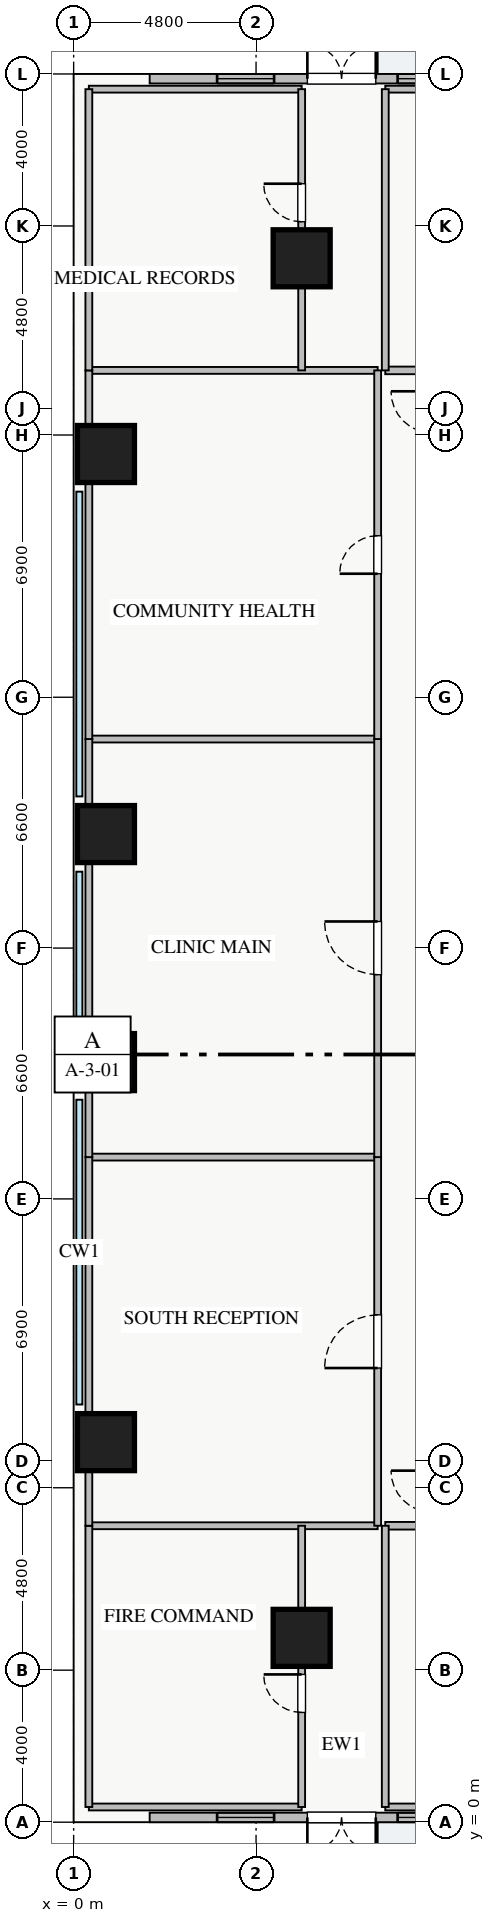
"""IFC4 building model, lengths in metres.
Left out: names, types, materials, properties, quantities, classifications, styles, units other than length and angle.
Written with IfcOpenShell. Run it as: python <this file> out.ifc"""

import sys

from ifc_helpers import new_model, si_unit, direction, frame, frame_2d, origin, origin_2d, place, context, subcontext, project, spatial, rectangle, extrude, source, transform, mapped, element, fill, save


model = new_model("IFC4")
c1 = context("Model", 3, precision=1e-05, world=origin(), true_north=direction((0.0, 1.0)))
c2 = subcontext(c1, "Body", "Model", "MODEL_VIEW")
j1 = project(units=[si_unit("LENGTHUNIT", "METRE"), si_unit("PLANEANGLEUNIT", "RADIAN")], contexts=[c1])
p1 = place(None, origin())
s1 = spatial("IfcSite", under=j1, at=p1, CompositionType="ELEMENT")
p2 = place(p1, origin())
s2 = spatial("IfcBuilding", under=s1, at=p2, CompositionType="ELEMENT")
p3 = place(p2, origin())
s3 = spatial("IfcBuildingStorey", under=s2, at=p3, CompositionType="ELEMENT", Elevation=0.0)
m1 = source(origin(), c2, "Body", "SweptSolid", [
    extrude(rectangle(XDim=1.5, YDim=1.5, at=origin_2d()), origin(), (0.0, 0.0, 1.0), 5.0),
])
for number, where, z_axis, x_axis in (
    (1, (6.0, 4.85, 0.0), (0.0, 0.0, 1.0), (1.0, 0.0, 0.0)),
    (2, (6.0, 41.15, 0.0), (0.0, 0.0, 1.0), (1.0, 0.0, 0.0)),
    (3, (0.85, 36.0, 0.0), (0.0, 0.0, 1.0), (1.0, 0.0, 0.0)),
    (4, (0.85, 26.0, 0.0), (0.0, 0.0, 1.0), (1.0, 0.0, 0.0)),
    (5, (0.85, 20.0, 0.0), (0.0, 0.0, 1.0), (1.0, 0.0, 0.0)),
    (6, (0.85, 10.0, 0.0), (0.0, 0.0, 1.0), (1.0, 0.0, 0.0)),
):
    element("IfcColumn", number, at=place(p3, frame(where, z_axis=z_axis, x_axis=x_axis)), inside=s3, PredefinedType="COLUMN", context=c2, shape_type="MappedRepresentation", body=[
        mapped(m1, transform((0.0, 0.0, 0.0), x_axis=(1.0, 0.0, 0.0), y_axis=(0.0, 1.0, 0.0), z_axis=(0.0, 0.0, 1.0), scale=1.0)),
    ])
p4 = place(p3, frame((2.0, 0.125, 0.0), z_axis=(0.0, 0.0, 1.0), x_axis=(1.0, 0.0, 0.0)))
e7 = element("IfcWall", 7, at=p4, inside=s3, PredefinedType="STANDARD", context=c2, shape_type="SweptSolid", body=[
    extrude(rectangle(XDim=10.1, YDim=0.25, at=frame_2d((5.05, 0.0))), origin(), (0.0, 0.0, 1.0), 4.32),
])
p5 = place(p4, frame((4.15, 0.0, 0.0)))
e8 = element("IfcOpeningElement", 8, at=p5, cuts=e7, PredefinedType="OPENING", context=c2, shape_type="SweptSolid", body=[
    extrude(rectangle(XDim=1.8, YDim=2.2, at=frame_2d((0.9, 1.1))), frame((0.0, 0.135, 0.0), z_axis=(0.0, -1.0, 0.0), x_axis=(1.0, 0.0, 0.0)), (0.0, 0.0, 1.0), 0.27),
])
p6 = place(p4, frame((1.775, 0.0, 0.9)))
e9 = element("IfcOpeningElement", 9, at=p6, cuts=e7, PredefinedType="OPENING", context=c2, shape_type="SweptSolid", body=[
    extrude(rectangle(XDim=1.5, YDim=1.45, at=frame_2d((0.75, 0.725))), frame((0.0, 0.135, 0.0), z_axis=(0.0, -1.0, 0.0), x_axis=(1.0, 0.0, 0.0)), (0.0, 0.0, 1.0), 0.27),
])
p7 = place(p4, frame((6.525, 0.0, 0.9)))
e10 = element("IfcOpeningElement", 10, at=p7, cuts=e7, PredefinedType="OPENING", context=c2, shape_type="SweptSolid", body=[
    extrude(rectangle(XDim=2.1, YDim=1.48, at=frame_2d((1.05, 0.74))), frame((0.0, 0.135, 0.0), z_axis=(0.0, -1.0, 0.0), x_axis=(1.0, 0.0, 0.0)), (0.0, 0.0, 1.0), 0.27),
])
p8 = place(p3, frame((2.0, 45.875, 0.0), z_axis=(0.0, 0.0, 1.0), x_axis=(1.0, 0.0, 0.0)))
e11 = element("IfcWall", 11, at=p8, inside=s3, PredefinedType="STANDARD", context=c2, shape_type="SweptSolid", body=[
    extrude(rectangle(XDim=10.1, YDim=0.25, at=frame_2d((5.05, 0.0))), origin(), (0.0, 0.0, 1.0), 4.32),
])
p9 = place(p8, frame((4.15, 0.0, 0.0)))
e12 = element("IfcOpeningElement", 12, at=p9, cuts=e11, PredefinedType="OPENING", context=c2, shape_type="SweptSolid", body=[
    extrude(rectangle(XDim=1.8, YDim=2.2, at=frame_2d((0.9, 1.1))), frame((0.0, 0.135, 0.0), z_axis=(0.0, -1.0, 0.0), x_axis=(1.0, 0.0, 0.0)), (0.0, 0.0, 1.0), 0.27),
])
p10 = place(p8, frame((1.775, 0.0, 0.9)))
e13 = element("IfcOpeningElement", 13, at=p10, cuts=e11, PredefinedType="OPENING", context=c2, shape_type="SweptSolid", body=[
    extrude(rectangle(XDim=1.5, YDim=1.45, at=frame_2d((0.75, 0.725))), frame((0.0, 0.135, 0.0), z_axis=(0.0, -1.0, 0.0), x_axis=(1.0, 0.0, 0.0)), (0.0, 0.0, 1.0), 0.27),
])
p11 = place(p8, frame((6.525, 0.0, 0.9)))
e14 = element("IfcOpeningElement", 14, at=p11, cuts=e11, PredefinedType="OPENING", context=c2, shape_type="SweptSolid", body=[
    extrude(rectangle(XDim=2.1, YDim=1.48, at=frame_2d((1.05, 0.74))), frame((0.0, 0.135, 0.0), z_axis=(0.0, -1.0, 0.0), x_axis=(1.0, 0.0, 0.0)), (0.0, 0.0, 1.0), 0.27),
])
p12 = place(p3, frame((8.2, 38.2, 0.0), z_axis=(0.0, 0.0, 1.0), x_axis=(1.0, 0.0, 0.0)))
e15 = element("IfcWall", 15, at=p12, inside=s3, PredefinedType="PARTITIONING", context=c2, shape_type="SweptSolid", body=[
    extrude(rectangle(XDim=9.8, YDim=0.2, at=frame_2d((4.9, 0.0))), origin(), (0.0, 0.0, 1.0), 4.78),
])
p13 = place(p12, frame((4.4, 0.0, 0.0)))
e16 = element("IfcOpeningElement", 16, at=p13, cuts=e15, PredefinedType="OPENING", context=c2, shape_type="SweptSolid", body=[
    extrude(rectangle(XDim=1.0, YDim=2.05, at=frame_2d((0.5, 1.025))), frame((0.0, 0.11, 0.0), z_axis=(0.0, -1.0, 0.0), x_axis=(1.0, 0.0, 0.0)), (0.0, 0.0, 1.0), 0.22),
])
p14 = place(p3, frame((8.2, 7.8, 0.0), z_axis=(0.0, 0.0, 1.0), x_axis=(1.0, 0.0, 0.0)))
e17 = element("IfcWall", 17, at=p14, inside=s3, PredefinedType="PARTITIONING", context=c2, shape_type="SweptSolid", body=[
    extrude(rectangle(XDim=9.8, YDim=0.2, at=frame_2d((4.9, 0.0))), origin(), (0.0, 0.0, 1.0), 4.78),
])
p15 = place(p14, frame((4.4, 0.0, 0.0)))
e18 = element("IfcOpeningElement", 18, at=p15, cuts=e17, PredefinedType="OPENING", context=c2, shape_type="SweptSolid", body=[
    extrude(rectangle(XDim=1.0, YDim=2.05, at=frame_2d((0.5, 1.025))), frame((0.0, 0.11, 0.0), z_axis=(0.0, -1.0, 0.0), x_axis=(1.0, 0.0, 0.0)), (0.0, 0.0, 1.0), 0.22),
])
p16 = place(p3, frame((0.4, 0.4, 0.0), z_axis=(0.0, 0.0, 1.0), x_axis=(1.0, 0.0, 0.0)))
e19 = element("IfcWall", 19, at=p16, inside=s3, PredefinedType="PARTITIONING", context=c2, shape_type="SweptSolid", body=[
    extrude(rectangle(XDim=5.6, YDim=0.18, at=frame_2d((2.8, 0.0))), origin(), (0.0, 0.0, 1.0), 4.78),
])
p17 = place(p3, frame((0.4, 7.8, 0.0), z_axis=(0.0, 0.0, 1.0), x_axis=(1.0, 0.0, 0.0)))
e20 = element("IfcWall", 20, at=p17, inside=s3, PredefinedType="PARTITIONING", context=c2, shape_type="SweptSolid", body=[
    extrude(rectangle(XDim=7.6, YDim=0.18, at=frame_2d((3.8, 0.0))), origin(), (0.0, 0.0, 1.0), 4.78),
])
p18 = place(p3, frame((0.4, 0.4, 0.0), z_axis=(0.0, 0.0, 1.0), x_axis=(0.0, 1.0, 0.0)))
e21 = element("IfcWall", 21, at=p18, inside=s3, PredefinedType="PARTITIONING", context=c2, shape_type="SweptSolid", body=[
    extrude(rectangle(XDim=7.4, YDim=0.18, at=frame_2d((3.7, 0.0))), origin(), (0.0, 0.0, 1.0), 4.78),
])
p19 = place(p3, frame((6.0, 0.4, 0.0), z_axis=(0.0, 0.0, 1.0), x_axis=(0.0, 1.0, 0.0)))
e22 = element("IfcWall", 22, at=p19, inside=s3, PredefinedType="PARTITIONING", context=c2, shape_type="SweptSolid", body=[
    extrude(rectangle(XDim=7.4, YDim=0.18, at=frame_2d((3.7, 0.0))), origin(), (0.0, 0.0, 1.0), 4.78),
])
p20 = place(p19, frame((2.488, 0.0, 0.0)))
e23 = element("IfcOpeningElement", 23, at=p20, cuts=e22, PredefinedType="OPENING", context=c2, shape_type="SweptSolid", body=[
    extrude(rectangle(XDim=1.0, YDim=2.05, at=frame_2d((0.5, 1.025))), frame((0.0, 0.1, 0.0), z_axis=(0.0, -1.0, 0.0), x_axis=(1.0, 0.0, 0.0)), (0.0, 0.0, 1.0), 0.2),
])
p21 = place(p3, frame((0.4, 17.5, 0.0), z_axis=(0.0, 0.0, 1.0), x_axis=(1.0, 0.0, 0.0)))
e24 = element("IfcWall", 24, at=p21, inside=s3, PredefinedType="PARTITIONING", context=c2, shape_type="SweptSolid", body=[
    extrude(rectangle(XDim=7.6, YDim=0.18, at=frame_2d((3.8, 0.0))), origin(), (0.0, 0.0, 1.0), 4.78),
])
p22 = place(p3, frame((0.4, 7.8, 0.0), z_axis=(0.0, 0.0, 1.0), x_axis=(0.0, 1.0, 0.0)))
e25 = element("IfcWall", 25, at=p22, inside=s3, PredefinedType="PARTITIONING", context=c2, shape_type="SweptSolid", body=[
    extrude(rectangle(XDim=9.7, YDim=0.18, at=frame_2d((4.85, 0.0))), origin(), (0.0, 0.0, 1.0), 4.78),
])
p23 = place(p3, frame((8.0, 7.8, 0.0), z_axis=(0.0, 0.0, 1.0), x_axis=(0.0, 1.0, 0.0)))
e26 = element("IfcWall", 26, at=p23, inside=s3, PredefinedType="PARTITIONING", context=c2, shape_type="SweptSolid", body=[
    extrude(rectangle(XDim=9.7, YDim=0.18, at=frame_2d((4.85, 0.0))), origin(), (0.0, 0.0, 1.0), 4.78),
])
p24 = place(p23, frame((4.15, 0.0, 0.0)))
e27 = element("IfcOpeningElement", 27, at=p24, cuts=e26, PredefinedType="OPENING", context=c2, shape_type="SweptSolid", body=[
    extrude(rectangle(XDim=1.4, YDim=2.05, at=frame_2d((0.7, 1.025))), frame((0.0, 0.1, 0.0), z_axis=(0.0, -1.0, 0.0), x_axis=(1.0, 0.0, 0.0)), (0.0, 0.0, 1.0), 0.2),
])
p25 = place(p3, frame((0.4, 28.5, 0.0), z_axis=(0.0, 0.0, 1.0), x_axis=(1.0, 0.0, 0.0)))
e28 = element("IfcWall", 28, at=p25, inside=s3, PredefinedType="PARTITIONING", context=c2, shape_type="SweptSolid", body=[
    extrude(rectangle(XDim=7.6, YDim=0.18, at=frame_2d((3.8, 0.0))), origin(), (0.0, 0.0, 1.0), 4.78),
])
p26 = place(p3, frame((0.4, 17.5, 0.0), z_axis=(0.0, 0.0, 1.0), x_axis=(0.0, 1.0, 0.0)))
e29 = element("IfcWall", 29, at=p26, inside=s3, PredefinedType="PARTITIONING", context=c2, shape_type="SweptSolid", body=[
    extrude(rectangle(XDim=11.0, YDim=0.18, at=frame_2d((5.5, 0.0))), origin(), (0.0, 0.0, 1.0), 4.78),
])
p27 = place(p3, frame((8.0, 17.5, 0.0), z_axis=(0.0, 0.0, 1.0), x_axis=(0.0, 1.0, 0.0)))
e30 = element("IfcWall", 30, at=p27, inside=s3, PredefinedType="PARTITIONING", context=c2, shape_type="SweptSolid", body=[
    extrude(rectangle(XDim=11.0, YDim=0.18, at=frame_2d((5.5, 0.0))), origin(), (0.0, 0.0, 1.0), 4.78),
])
p28 = place(p27, frame((4.8, 0.0, 0.0)))
e31 = element("IfcOpeningElement", 31, at=p28, cuts=e30, PredefinedType="OPENING", context=c2, shape_type="SweptSolid", body=[
    extrude(rectangle(XDim=1.4, YDim=2.05, at=frame_2d((0.7, 1.025))), frame((0.0, 0.1, 0.0), z_axis=(0.0, -1.0, 0.0), x_axis=(1.0, 0.0, 0.0)), (0.0, 0.0, 1.0), 0.2),
])
p29 = place(p3, frame((0.4, 38.2, 0.0), z_axis=(0.0, 0.0, 1.0), x_axis=(1.0, 0.0, 0.0)))
e32 = element("IfcWall", 32, at=p29, inside=s3, PredefinedType="PARTITIONING", context=c2, shape_type="SweptSolid", body=[
    extrude(rectangle(XDim=7.6, YDim=0.18, at=frame_2d((3.8, 0.0))), origin(), (0.0, 0.0, 1.0), 4.78),
])
p30 = place(p3, frame((0.4, 28.5, 0.0), z_axis=(0.0, 0.0, 1.0), x_axis=(0.0, 1.0, 0.0)))
e33 = element("IfcWall", 33, at=p30, inside=s3, PredefinedType="PARTITIONING", context=c2, shape_type="SweptSolid", body=[
    extrude(rectangle(XDim=9.7, YDim=0.18, at=frame_2d((4.85, 0.0))), origin(), (0.0, 0.0, 1.0), 4.78),
])
p31 = place(p3, frame((8.0, 28.5, 0.0), z_axis=(0.0, 0.0, 1.0), x_axis=(0.0, 1.0, 0.0)))
e34 = element("IfcWall", 34, at=p31, inside=s3, PredefinedType="PARTITIONING", context=c2, shape_type="SweptSolid", body=[
    extrude(rectangle(XDim=9.7, YDim=0.18, at=frame_2d((4.85, 0.0))), origin(), (0.0, 0.0, 1.0), 4.78),
])
p32 = place(p31, frame((4.35, 0.0, 0.0)))
e35 = element("IfcOpeningElement", 35, at=p32, cuts=e34, PredefinedType="OPENING", context=c2, shape_type="SweptSolid", body=[
    extrude(rectangle(XDim=1.0, YDim=2.05, at=frame_2d((0.5, 1.025))), frame((0.0, 0.1, 0.0), z_axis=(0.0, -1.0, 0.0), x_axis=(1.0, 0.0, 0.0)), (0.0, 0.0, 1.0), 0.2),
])
p33 = place(p3, frame((0.4, 45.6, 0.0), z_axis=(0.0, 0.0, 1.0), x_axis=(1.0, 0.0, 0.0)))
e36 = element("IfcWall", 36, at=p33, inside=s3, PredefinedType="PARTITIONING", context=c2, shape_type="SweptSolid", body=[
    extrude(rectangle(XDim=5.6, YDim=0.18, at=frame_2d((2.8, 0.0))), origin(), (0.0, 0.0, 1.0), 4.78),
])
p34 = place(p3, frame((0.4, 38.2, 0.0), z_axis=(0.0, 0.0, 1.0), x_axis=(0.0, 1.0, 0.0)))
e37 = element("IfcWall", 37, at=p34, inside=s3, PredefinedType="PARTITIONING", context=c2, shape_type="SweptSolid", body=[
    extrude(rectangle(XDim=7.4, YDim=0.18, at=frame_2d((3.7, 0.0))), origin(), (0.0, 0.0, 1.0), 4.78),
])
p35 = place(p3, frame((6.0, 38.2, 0.0), z_axis=(0.0, 0.0, 1.0), x_axis=(0.0, 1.0, 0.0)))
e38 = element("IfcWall", 38, at=p35, inside=s3, PredefinedType="PARTITIONING", context=c2, shape_type="SweptSolid", body=[
    extrude(rectangle(XDim=7.4, YDim=0.18, at=frame_2d((3.7, 0.0))), origin(), (0.0, 0.0, 1.0), 4.78),
])
p36 = place(p35, frame((3.912, 0.0, 0.0)))
e39 = element("IfcOpeningElement", 39, at=p36, cuts=e38, PredefinedType="OPENING", context=c2, shape_type="SweptSolid", body=[
    extrude(rectangle(XDim=1.0, YDim=2.05, at=frame_2d((0.5, 1.025))), frame((0.0, 0.1, 0.0), z_axis=(0.0, -1.0, 0.0), x_axis=(1.0, 0.0, 0.0)), (0.0, 0.0, 1.0), 0.2),
])
p37 = place(p3, frame((8.2, 0.4, 0.0), z_axis=(0.0, 0.0, 1.0), x_axis=(1.0, 0.0, 0.0)))
e40 = element("IfcWall", 40, at=p37, inside=s3, PredefinedType="PARTITIONING", context=c2, shape_type="SweptSolid", body=[
    extrude(rectangle(XDim=9.8, YDim=0.18, at=frame_2d((4.9, 0.0))), origin(), (0.0, 0.0, 1.0), 4.78),
])
p38 = place(p3, frame((8.2, 0.4, 0.0), z_axis=(0.0, 0.0, 1.0), x_axis=(0.0, 1.0, 0.0)))
e41 = element("IfcWall", 41, at=p38, inside=s3, PredefinedType="PARTITIONING", context=c2, shape_type="SweptSolid", body=[
    extrude(rectangle(XDim=7.4, YDim=0.18, at=frame_2d((3.7, 0.0))), origin(), (0.0, 0.0, 1.0), 4.78),
])
p39 = place(p3, frame((8.2, 45.6, 0.0), z_axis=(0.0, 0.0, 1.0), x_axis=(1.0, 0.0, 0.0)))
e42 = element("IfcWall", 42, at=p39, inside=s3, PredefinedType="PARTITIONING", context=c2, shape_type="SweptSolid", body=[
    extrude(rectangle(XDim=9.8, YDim=0.18, at=frame_2d((4.9, 0.0))), origin(), (0.0, 0.0, 1.0), 4.78),
])
p40 = place(p3, frame((8.2, 38.2, 0.0), z_axis=(0.0, 0.0, 1.0), x_axis=(0.0, 1.0, 0.0)))
e43 = element("IfcWall", 43, at=p40, inside=s3, PredefinedType="PARTITIONING", context=c2, shape_type="SweptSolid", body=[
    extrude(rectangle(XDim=7.4, YDim=0.18, at=frame_2d((3.7, 0.0))), origin(), (0.0, 0.0, 1.0), 4.78),
])
m2 = source(origin(), c2, "Body", "SweptSolid", [
    extrude(rectangle(XDim=1.8, YDim=2.2, at=frame_2d((0.9, 1.1))), frame((0.0, 0.025, 0.0), z_axis=(0.0, -1.0, 0.0), x_axis=(1.0, 0.0, 0.0)), (0.0, 0.0, 1.0), 0.05),
])
p41 = place(p5, frame((1.8, 0.0, 0.0), z_axis=(0.0, 0.0, 1.0), x_axis=(-1.0, 0.0, 0.0)))
e44 = element("IfcDoor", 44, at=p41, inside=s3, OperationType="DOUBLE_DOOR_SINGLE_SWING", PredefinedType="DOOR", context=c2, shape_type="MappedRepresentation", body=[
    mapped(m2, transform((0.0, 0.0, 0.0), x_axis=(1.0, 0.0, 0.0), y_axis=(0.0, 1.0, 0.0), z_axis=(0.0, 0.0, 1.0), scale=1.0)),
])
fill(e8, e44)
m3 = source(origin(), c2, "Body", "SweptSolid", [
    extrude(rectangle(XDim=1.5, YDim=1.45, at=frame_2d((0.75, 0.725))), frame((0.0, 0.03, 0.0), z_axis=(0.0, -1.0, 0.0), x_axis=(1.0, 0.0, 0.0)), (0.0, 0.0, 1.0), 0.06),
])
p42 = place(p6, origin())
e45 = element("IfcWindow", 45, at=p42, inside=s3, PartitioningType="DOUBLE_PANEL_VERTICAL", PredefinedType="WINDOW", context=c2, shape_type="MappedRepresentation", body=[
    mapped(m3, transform((0.0, 0.0, 0.0), x_axis=(1.0, 0.0, 0.0), y_axis=(0.0, 1.0, 0.0), z_axis=(0.0, 0.0, 1.0), scale=1.0)),
])
fill(e9, e45)
m4 = source(origin(), c2, "Body", "SweptSolid", [
    extrude(rectangle(XDim=2.1, YDim=1.48, at=frame_2d((1.05, 0.74))), frame((0.0, 0.03, 0.0), z_axis=(0.0, -1.0, 0.0), x_axis=(1.0, 0.0, 0.0)), (0.0, 0.0, 1.0), 0.06),
])
p43 = place(p7, origin())
e46 = element("IfcWindow", 46, at=p43, inside=s3, PartitioningType="TRIPLE_PANEL_VERTICAL", PredefinedType="WINDOW", context=c2, shape_type="MappedRepresentation", body=[
    mapped(m4, transform((0.0, 0.0, 0.0), x_axis=(1.0, 0.0, 0.0), y_axis=(0.0, 1.0, 0.0), z_axis=(0.0, 0.0, 1.0), scale=1.0)),
])
fill(e10, e46)
p44 = place(p9, origin())
e47 = element("IfcDoor", 47, at=p44, inside=s3, OperationType="DOUBLE_DOOR_SINGLE_SWING", PredefinedType="DOOR", context=c2, shape_type="MappedRepresentation", body=[
    mapped(m2, transform((0.0, 0.0, 0.0), x_axis=(1.0, 0.0, 0.0), y_axis=(0.0, 1.0, 0.0), z_axis=(0.0, 0.0, 1.0), scale=1.0)),
])
fill(e12, e47)
p45 = place(p10, origin())
e48 = element("IfcWindow", 48, at=p45, inside=s3, PartitioningType="DOUBLE_PANEL_VERTICAL", PredefinedType="WINDOW", context=c2, shape_type="MappedRepresentation", body=[
    mapped(m3, transform((0.0, 0.0, 0.0), x_axis=(1.0, 0.0, 0.0), y_axis=(0.0, 1.0, 0.0), z_axis=(0.0, 0.0, 1.0), scale=1.0)),
])
fill(e13, e48)
p46 = place(p11, origin())
e49 = element("IfcWindow", 49, at=p46, inside=s3, PartitioningType="TRIPLE_PANEL_VERTICAL", PredefinedType="WINDOW", context=c2, shape_type="MappedRepresentation", body=[
    mapped(m4, transform((0.0, 0.0, 0.0), x_axis=(1.0, 0.0, 0.0), y_axis=(0.0, 1.0, 0.0), z_axis=(0.0, 0.0, 1.0), scale=1.0)),
])
fill(e14, e49)
m5 = source(origin(), c2, "Body", "SweptSolid", [
    extrude(rectangle(XDim=1.0, YDim=2.05, at=frame_2d((0.5, 1.025))), frame((0.0, 0.025, 0.0), z_axis=(0.0, -1.0, 0.0), x_axis=(1.0, 0.0, 0.0)), (0.0, 0.0, 1.0), 0.05),
])
p47 = place(p20, origin())
e50 = element("IfcDoor", 50, at=p47, inside=s3, OperationType="SINGLE_SWING_RIGHT", PredefinedType="DOOR", context=c2, shape_type="MappedRepresentation", body=[
    mapped(m5, transform((0.0, 0.0, 0.0), x_axis=(1.0, 0.0, 0.0), y_axis=(0.0, 1.0, 0.0), z_axis=(0.0, 0.0, 1.0), scale=1.0)),
])
fill(e23, e50)
m6 = source(origin(), c2, "Body", "SweptSolid", [
    extrude(rectangle(XDim=1.4, YDim=2.05, at=frame_2d((0.7, 1.025))), frame((0.0, 0.025, 0.0), z_axis=(0.0, -1.0, 0.0), x_axis=(1.0, 0.0, 0.0)), (0.0, 0.0, 1.0), 0.05),
])
p48 = place(p24, origin())
e51 = element("IfcDoor", 51, at=p48, inside=s3, OperationType="SINGLE_SWING_LEFT", PredefinedType="DOOR", context=c2, shape_type="MappedRepresentation", body=[
    mapped(m6, transform((0.0, 0.0, 0.0), x_axis=(1.0, 0.0, 0.0), y_axis=(0.0, 1.0, 0.0), z_axis=(0.0, 0.0, 1.0), scale=1.0)),
])
fill(e27, e51)
p49 = place(p28, origin())
e52 = element("IfcDoor", 52, at=p49, inside=s3, OperationType="SINGLE_SWING_RIGHT", PredefinedType="DOOR", context=c2, shape_type="MappedRepresentation", body=[
    mapped(m6, transform((0.0, 0.0, 0.0), x_axis=(1.0, 0.0, 0.0), y_axis=(0.0, 1.0, 0.0), z_axis=(0.0, 0.0, 1.0), scale=1.0)),
])
fill(e31, e52)
p50 = place(p32, origin())
e53 = element("IfcDoor", 53, at=p50, inside=s3, OperationType="SINGLE_SWING_LEFT", PredefinedType="DOOR", context=c2, shape_type="MappedRepresentation", body=[
    mapped(m5, transform((0.0, 0.0, 0.0), x_axis=(1.0, 0.0, 0.0), y_axis=(0.0, 1.0, 0.0), z_axis=(0.0, 0.0, 1.0), scale=1.0)),
])
fill(e35, e53)
p51 = place(p36, origin())
e54 = element("IfcDoor", 54, at=p51, inside=s3, OperationType="SINGLE_SWING_RIGHT", PredefinedType="DOOR", context=c2, shape_type="MappedRepresentation", body=[
    mapped(m5, transform((0.0, 0.0, 0.0), x_axis=(1.0, 0.0, 0.0), y_axis=(0.0, 1.0, 0.0), z_axis=(0.0, 0.0, 1.0), scale=1.0)),
])
fill(e39, e54)
save(model, sys.argv[1])
